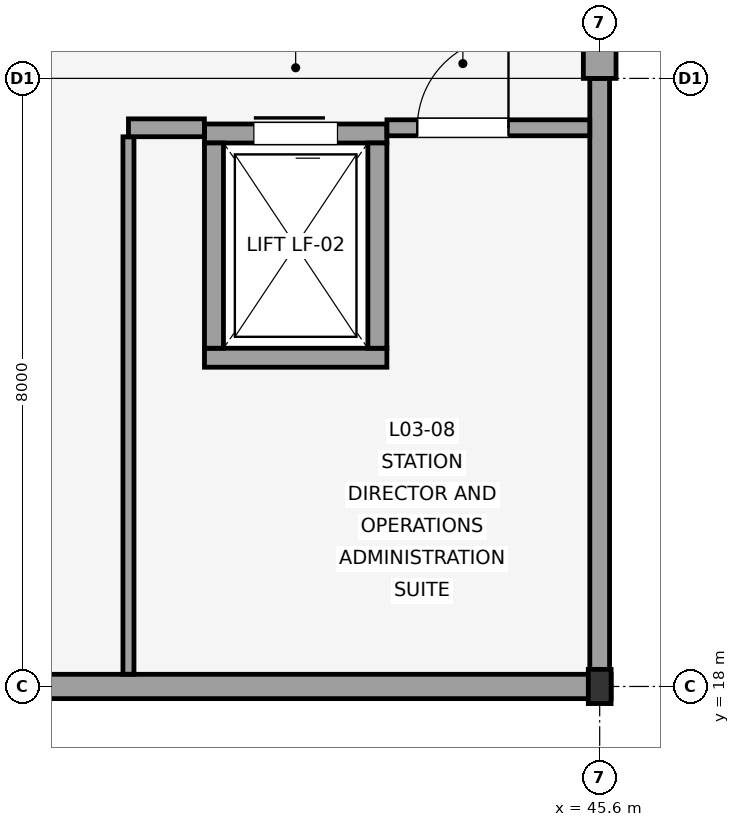
"""IFC4 building model, lengths in metres.
Left out: names, types, materials, properties, quantities, classifications, styles, units other than length and angle.
Written with IfcOpenShell. Run it as: python <this file> out.ifc"""

import sys

from ifc_helpers import new_model, si_unit, direction, frame, frame_2d, origin, origin_2d, place, context, subcontext, project, spatial, rectangle, i_section, extrude, element, fill, save


model = new_model("IFC4")
c1 = context("Model", 3, precision=1e-05, world=origin(), true_north=direction((0.0, 1.0)))
c2 = subcontext(c1, "Body", "Model", "MODEL_VIEW")
j1 = project(units=[si_unit("LENGTHUNIT", "METRE"), si_unit("PLANEANGLEUNIT", "RADIAN")], contexts=[c1])
p1 = place(None, origin())
s1 = spatial("IfcSite", under=j1, at=p1, CompositionType="ELEMENT")
p2 = place(p1, origin())
s2 = spatial("IfcBuilding", under=s1, at=p2, CompositionType="ELEMENT")
p3 = place(p2, frame((0.0, 0.0, 13.8)))
s3 = spatial("IfcBuildingStorey", under=s2, at=p3, CompositionType="ELEMENT", Elevation=13.8)
p4 = place(p3, frame((45.6, 18.0, 0.0), z_axis=(0.0, 0.0, 1.0), x_axis=(1.0, 0.0, 0.0)))
e1 = element("IfcColumn", 1, at=p4, inside=s3, PredefinedType="COLUMN", context=c2, shape_type="SweptSolid", body=[
    extrude(i_section(OverallWidth=0.3, OverallDepth=0.45, WebThickness=0.014, FlangeThickness=0.026, FilletRadius=0.027, at=origin_2d()), origin(), (0.0, 0.0, 1.0), 4.5),
])
p5 = place(p3, frame((36.751, 18.0, 0.0), z_axis=(0.0, 0.0, 1.0), x_axis=(1.0, 0.0, 0.0)))
e2 = element("IfcWall", 2, at=p5, inside=s3, PredefinedType="SOLIDWALL", context=c2, shape_type="SweptSolid", body=[
    extrude(rectangle(XDim=8.999, YDim=0.32, at=frame_2d((4.5, 0.0))), origin(), (0.0, 0.0, 1.0), 2.55),
])
p6 = place(p3, frame((45.6, 18.161, 0.0), z_axis=(0.0, 0.0, 1.0), x_axis=(0.0, 1.0, 0.0)))
e3 = element("IfcWall", 3, at=p6, inside=s3, PredefinedType="SOLIDWALL", context=c2, shape_type="SweptSolid", body=[
    extrude(rectangle(XDim=7.839, YDim=0.26, at=frame_2d((3.919, 0.0))), origin(), (0.0, 0.0, 1.0), 2.55),
])
p7 = place(p3, frame((45.6, 26.0, 0.0), z_axis=(0.0, 0.0, 1.0), x_axis=(0.0, 1.0, 0.0)))
e4 = element("IfcWall", 4, at=p7, inside=s3, PredefinedType="SOLIDWALL", context=c2, shape_type="SweptSolid", body=[
    extrude(rectangle(XDim=8.0, YDim=0.43, at=frame_2d((4.0, 0.0))), origin(), (0.0, 0.0, 1.0), 2.55),
])
p8 = place(p3, frame((40.4, 22.325, 0.0), z_axis=(0.0, 0.0, 1.0), x_axis=(1.0, 0.0, 0.0)))
e5 = element("IfcWall", 5, at=p8, inside=s3, PredefinedType="SHEAR", context=c2, shape_type="SweptSolid", body=[
    extrude(rectangle(XDim=2.4, YDim=0.25, at=frame_2d((1.2, 0.0))), origin(), (0.0, 0.0, 1.0), 4.5),
])
p9 = place(p3, frame((40.4, 25.275, 0.0), z_axis=(0.0, 0.0, 1.0), x_axis=(1.0, 0.0, 0.0)))
e6 = element("IfcWall", 6, at=p9, inside=s3, PredefinedType="SHEAR", context=c2, shape_type="SweptSolid", body=[
    extrude(rectangle(XDim=2.4, YDim=0.25, at=frame_2d((1.2, 0.0))), origin(), (0.0, 0.0, 1.0), 4.5),
])
p10 = place(p9, frame((0.65, 0.0, 0.0)))
e7 = element("IfcOpeningElement", 7, at=p10, cuts=e6, PredefinedType="OPENING", context=c2, shape_type="SweptSolid", body=[
    extrude(rectangle(XDim=1.1, YDim=2.15, at=frame_2d((0.55, 1.075))), frame((0.0, 0.135, 0.0), z_axis=(0.0, -1.0, 0.0), x_axis=(1.0, 0.0, 0.0)), (0.0, 0.0, 1.0), 0.27),
])
for number, where, z_axis, x_axis in (
    (8, (40.525, 22.45, 0.0), (0.0, 0.0, 1.0), (0.0, 1.0, 0.0)),
    (9, (42.675, 22.45, 0.0), (0.0, 0.0, 1.0), (0.0, 1.0, 0.0)),
):
    element("IfcWall", number, at=place(p3, frame(where, z_axis=z_axis, x_axis=x_axis)), inside=s3, PredefinedType="SHEAR", context=c2, shape_type="SweptSolid", body=[
        extrude(rectangle(XDim=2.7, YDim=0.25, at=frame_2d((1.35, 0.0))), origin(), (0.0, 0.0, 1.0), 4.5),
    ])
p11 = place(p3, frame((39.4, 18.161, 0.0), z_axis=(0.0, 0.0, 1.0), x_axis=(0.0, 1.0, 0.0)))
e10 = element("IfcWall", 10, at=p11, inside=s3, PredefinedType="PARTITIONING", context=c2, shape_type="SweptSolid", body=[
    extrude(rectangle(XDim=7.071, YDim=0.145, at=frame_2d((3.535, 0.0))), origin(), (0.0, 0.0, 1.0), 2.7),
])
p12 = place(p3, frame((39.4, 25.35, 0.0), z_axis=(0.0, 0.0, 1.0), x_axis=(1.0, 0.0, 0.0)))
e11 = element("IfcWall", 11, at=p12, inside=s3, PredefinedType="PARTITIONING", context=c2, shape_type="SweptSolid", body=[
    extrude(rectangle(XDim=0.999, YDim=0.235, at=frame_2d((0.5, 0.0))), origin(), (0.0, 0.0, 1.0), 2.7),
])
p13 = place(p3, frame((42.801, 25.35, 0.0), z_axis=(0.0, 0.0, 1.0), x_axis=(1.0, 0.0, 0.0)))
e12 = element("IfcWall", 12, at=p13, inside=s3, PredefinedType="PARTITIONING", context=c2, shape_type="SweptSolid", body=[
    extrude(rectangle(XDim=2.668, YDim=0.21, at=frame_2d((1.334, 0.0))), origin(), (0.0, 0.0, 1.0), 2.7),
])
p14 = place(p13, frame((0.399, 0.0, 0.0)))
e13 = element("IfcOpeningElement", 13, at=p14, cuts=e12, PredefinedType="OPENING", context=c2, shape_type="SweptSolid", body=[
    extrude(rectangle(XDim=1.2, YDim=2.18, at=frame_2d((0.6, 1.09))), frame((0.0, 0.115, 0.0), z_axis=(0.0, -1.0, 0.0), x_axis=(1.0, 0.0, 0.0)), (0.0, 0.0, 1.0), 0.23),
])
p15 = place(p10, origin())
e14 = element("IfcDoor", 14, at=p15, inside=s3, OperationType="SLIDING_TO_LEFT", PredefinedType="DOOR", context=c2, shape_type="SweptSolid", body=[
    extrude(rectangle(XDim=1.1, YDim=2.15, at=frame_2d((0.55, 1.075))), frame((0.0, 0.025, 0.0), z_axis=(0.0, -1.0, 0.0), x_axis=(1.0, 0.0, 0.0)), (0.0, 0.0, 1.0), 0.05),
])
fill(e7, e14)
p16 = place(p14, origin())
e15 = element("IfcDoor", 15, at=p16, inside=s3, OperationType="SINGLE_SWING_RIGHT", PredefinedType="DOOR", context=c2, shape_type="SweptSolid", body=[
    extrude(rectangle(XDim=1.2, YDim=2.18, at=frame_2d((0.6, 1.09))), frame((0.0, 0.025, 0.0), z_axis=(0.0, -1.0, 0.0), x_axis=(1.0, 0.0, 0.0)), (0.0, 0.0, 1.0), 0.05),
])
fill(e13, e15)
save(model, sys.argv[1])
